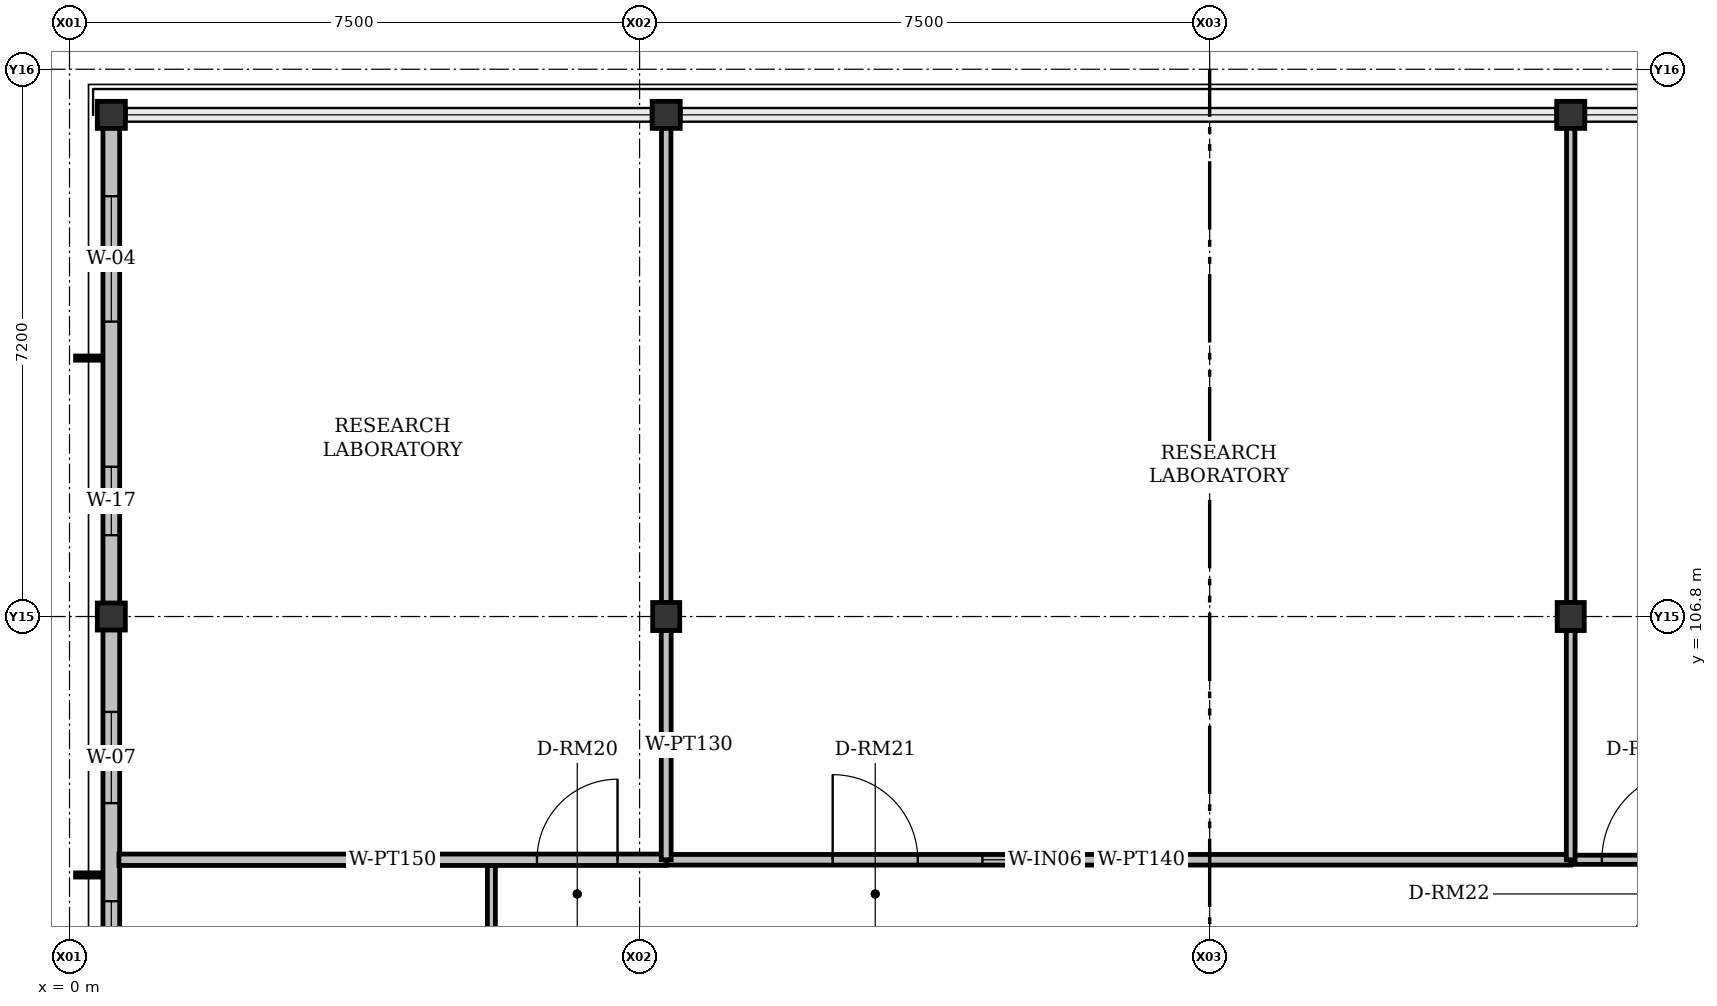
"""IFC4 building model, lengths in metres.
Left out: names, types, materials, properties, quantities, classifications, styles, units other than length and angle.
Written with IfcOpenShell. Run it as: python <this file> out.ifc"""

import sys

from ifc_helpers import new_model, si_unit, direction, frame, frame_2d, origin, origin_2d, place, context, subcontext, project, spatial, rectangle, i_section, extrude, element, fill, save


model = new_model("IFC4")
c1 = context("Model", 3, precision=1e-05, world=origin(), true_north=direction((0.0, 1.0)))
c2 = subcontext(c1, "Body", "Model", "MODEL_VIEW")
j1 = project(units=[si_unit("LENGTHUNIT", "METRE"), si_unit("PLANEANGLEUNIT", "RADIAN")], contexts=[c1])
p1 = place(None, origin())
s1 = spatial("IfcSite", under=j1, at=p1, CompositionType="ELEMENT")
p2 = place(p1, origin())
s2 = spatial("IfcBuilding", under=s1, at=p2, CompositionType="ELEMENT")
p3 = place(p2, frame((0.0, 0.0, 47.7)))
s3 = spatial("IfcBuildingStorey", under=s2, at=p3, CompositionType="ELEMENT", Elevation=47.7)
for number, where, z_axis, x_axis in (
    (1, (0.55, 106.8, 0.0), (0.0, 0.0, 1.0), (1.0, 0.0, 0.0)),
    (2, (7.85, 106.8, 0.0), (0.0, 0.0, 1.0), (0.0, 1.0, 0.0)),
    (3, (19.75, 106.8, 0.0), (0.0, 0.0, 1.0), (0.0, 1.0, 0.0)),
    (4, (0.55, 113.4, 0.0), (0.0, 0.0, 1.0), (1.0, 0.0, 0.0)),
    (5, (7.85, 113.4, 0.0), (0.0, 0.0, 1.0), (1.0, 0.0, 0.0)),
    (6, (19.75, 113.4, 0.0), (0.0, 0.0, 1.0), (1.0, 0.0, 0.0)),
):
    element("IfcColumn", number, at=place(p3, frame(where, z_axis=z_axis, x_axis=x_axis)), inside=s3, PredefinedType="COLUMN", context=c2, shape_type="SweptSolid", body=[
        extrude(i_section(OverallWidth=0.369, OverallDepth=0.356, WebThickness=0.011, FlangeThickness=0.018, FilletRadius=0.015, at=origin_2d()), origin(), (0.0, 0.0, 1.0), 4.2),
    ])
p4 = place(p3, frame((0.55, 99.6, 0.0), z_axis=(0.0, 0.0, 1.0), x_axis=(0.0, 1.0, 0.0)))
e7 = element("IfcWall", 7, at=p4, inside=s3, PredefinedType="SOLIDWALL", context=c2, shape_type="SweptSolid", body=[
    extrude(rectangle(XDim=7.2, YDim=0.22, at=frame_2d((3.6, 0.0))), origin(), (0.0, 0.0, 1.0), 3.577),
])
p5 = place(p4, frame((1.055, 0.0, 0.92)))
e8 = element("IfcOpeningElement", 8, at=p5, cuts=e7, PredefinedType="OPENING", context=c2, shape_type="SweptSolid", body=[
    extrude(rectangle(XDim=2.4, YDim=1.7, at=frame_2d((1.2, 0.85))), frame((0.0, 0.11, 0.0), z_axis=(0.0, -1.0, 0.0), x_axis=(1.0, 0.0, 0.0)), (0.0, 0.0, 1.0), 0.22),
])
p6 = place(p4, frame((4.745, 0.0, 0.92)))
e9 = element("IfcOpeningElement", 9, at=p6, cuts=e7, PredefinedType="OPENING", context=c2, shape_type="SweptSolid", body=[
    extrude(rectangle(XDim=1.2, YDim=1.55, at=frame_2d((0.6, 0.775))), frame((0.0, 0.11, 0.0), z_axis=(0.0, -1.0, 0.0), x_axis=(1.0, 0.0, 0.0)), (0.0, 0.0, 1.0), 0.22),
])
p7 = place(p3, frame((0.55, 106.8, 0.0), z_axis=(0.0, 0.0, 1.0), x_axis=(0.0, 1.0, 0.0)))
e10 = element("IfcWall", 10, at=p7, inside=s3, PredefinedType="SOLIDWALL", context=c2, shape_type="SweptSolid", body=[
    extrude(rectangle(XDim=6.6, YDim=0.22, at=frame_2d((3.3, 0.0))), origin(), (0.0, 0.0, 1.0), 3.577),
])
p8 = place(p7, frame((1.07, 0.0, 0.92)))
e11 = element("IfcOpeningElement", 11, at=p8, cuts=e10, PredefinedType="OPENING", context=c2, shape_type="SweptSolid", body=[
    extrude(rectangle(XDim=0.9, YDim=1.3, at=frame_2d((0.45, 0.65))), frame((0.0, 0.11, 0.0), z_axis=(0.0, -1.0, 0.0), x_axis=(1.0, 0.0, 0.0)), (0.0, 0.0, 1.0), 0.22),
])
p9 = place(p7, frame((3.88, 0.0, 0.92)))
e12 = element("IfcOpeningElement", 12, at=p9, cuts=e10, PredefinedType="OPENING", context=c2, shape_type="SweptSolid", body=[
    extrude(rectangle(XDim=1.65, YDim=1.4, at=frame_2d((0.825, 0.7))), frame((0.0, 0.11, 0.0), z_axis=(0.0, -1.0, 0.0), x_axis=(1.0, 0.0, 0.0)), (0.0, 0.0, 1.0), 0.22),
])
p10 = place(p3, frame((5.55, 85.2, 0.0), z_axis=(0.0, 0.0, 1.0), x_axis=(0.0, 1.0, 0.0)))
e13 = element("IfcWall", 13, at=p10, inside=s3, PredefinedType="PARTITIONING", context=c2, shape_type="SweptSolid", body=[
    extrude(rectangle(XDim=18.4, YDim=0.105, at=frame_2d((9.2, 0.0))), origin(), (0.0, 0.0, 1.0), 3.451),
])
p11 = place(p10, frame((8.7, 0.0, 0.0)))
e14 = element("IfcOpeningElement", 14, at=p11, cuts=e13, PredefinedType="OPENING", context=c2, shape_type="SweptSolid", body=[
    extrude(rectangle(XDim=1.0, YDim=2.25, at=frame_2d((0.5, 1.125))), frame((0.0, 0.052, 0.0), z_axis=(0.0, -1.0, 0.0), x_axis=(1.0, 0.0, 0.0)), (0.0, 0.0, 1.0), 0.105),
])
p12 = place(p10, frame((10.55, 0.0, 0.92)))
e15 = element("IfcOpeningElement", 15, at=p12, cuts=e13, PredefinedType="OPENING", context=c2, shape_type="SweptSolid", body=[
    extrude(rectangle(XDim=0.9, YDim=1.2, at=frame_2d((0.45, 0.6))), frame((0.0, 0.052, 0.0), z_axis=(0.0, -1.0, 0.0), x_axis=(1.0, 0.0, 0.0)), (0.0, 0.0, 1.0), 0.105),
])
p13 = place(p3, frame((0.65, 103.6, 0.0), z_axis=(0.0, 0.0, 1.0), x_axis=(1.0, 0.0, 0.0)))
e16 = element("IfcWall", 16, at=p13, inside=s3, PredefinedType="PARTITIONING", context=c2, shape_type="SweptSolid", body=[
    extrude(rectangle(XDim=7.2, YDim=0.15, at=frame_2d((3.6, 0.0))), origin(), (0.0, 0.0, 1.0), 3.527),
])
p14 = place(p13, frame((5.5, 0.0, 0.0)))
e17 = element("IfcOpeningElement", 17, at=p14, cuts=e16, PredefinedType="OPENING", context=c2, shape_type="SweptSolid", body=[
    extrude(rectangle(XDim=1.06, YDim=2.25, at=frame_2d((0.53, 1.125))), frame((0.0, 0.075, 0.0), z_axis=(0.0, -1.0, 0.0), x_axis=(1.0, 0.0, 0.0)), (0.0, 0.0, 1.0), 0.15),
])
p15 = place(p3, frame((7.85, 103.6, 0.0), z_axis=(0.0, 0.0, 1.0), x_axis=(1.0, 0.0, 0.0)))
e18 = element("IfcWall", 18, at=p15, inside=s3, PredefinedType="PARTITIONING", context=c2, shape_type="SweptSolid", body=[
    extrude(rectangle(XDim=11.9, YDim=0.14, at=frame_2d((5.95, 0.0))), origin(), (0.0, 0.0, 1.0), 3.527),
])
p16 = place(p15, frame((2.19, 0.0, 0.0)))
e19 = element("IfcOpeningElement", 19, at=p16, cuts=e18, PredefinedType="OPENING", context=c2, shape_type="SweptSolid", body=[
    extrude(rectangle(XDim=1.12, YDim=2.25, at=frame_2d((0.56, 1.125))), frame((0.0, 0.07, 0.0), z_axis=(0.0, -1.0, 0.0), x_axis=(1.0, 0.0, 0.0)), (0.0, 0.0, 1.0), 0.14),
])
p17 = place(p15, frame((4.16, 0.0, 0.92)))
e20 = element("IfcOpeningElement", 20, at=p17, cuts=e18, PredefinedType="OPENING", context=c2, shape_type="SweptSolid", body=[
    extrude(rectangle(XDim=1.05, YDim=1.2, at=frame_2d((0.525, 0.6))), frame((0.0, 0.07, 0.0), z_axis=(0.0, -1.0, 0.0), x_axis=(1.0, 0.0, 0.0)), (0.0, 0.0, 1.0), 0.14),
])
p18 = place(p3, frame((7.85, 106.621, 0.0), z_axis=(0.0, 0.0, 1.0), x_axis=(0.0, -1.0, 0.0)))
e21 = element("IfcWall", 21, at=p18, inside=s3, PredefinedType="PARTITIONING", context=c2, shape_type="SweptSolid", body=[
    extrude(rectangle(XDim=3.021, YDim=0.13, at=frame_2d((1.51, 0.0))), origin(), (0.0, 0.0, 1.0), 3.527),
])
p19 = place(p3, frame((7.85, 113.35, 0.0), z_axis=(0.0, 0.0, 1.0), x_axis=(0.0, -1.0, 0.0)))
e22 = element("IfcWall", 22, at=p19, inside=s3, PredefinedType="PARTITIONING", context=c2, shape_type="SweptSolid", body=[
    extrude(rectangle(XDim=6.371, YDim=0.125, at=frame_2d((3.185, 0.0))), origin(), (0.0, 0.0, 1.0), 3.527),
])
p20 = place(p3, frame((19.75, 103.6, 0.0), z_axis=(0.0, 0.0, 1.0), x_axis=(1.0, 0.0, 0.0)))
e23 = element("IfcWall", 23, at=p20, inside=s3, PredefinedType="PARTITIONING", context=c2, shape_type="SweptSolid", body=[
    extrude(rectangle(XDim=5.04, YDim=0.12, at=frame_2d((2.52, 0.0))), origin(), (0.0, 0.0, 1.0), 3.527),
])
p21 = place(p20, frame((0.41, 0.0, 0.0)))
e24 = element("IfcOpeningElement", 24, at=p21, cuts=e23, PredefinedType="OPENING", context=c2, shape_type="SweptSolid", body=[
    extrude(rectangle(XDim=1.18, YDim=2.25, at=frame_2d((0.59, 1.125))), frame((0.0, 0.06, 0.0), z_axis=(0.0, -1.0, 0.0), x_axis=(1.0, 0.0, 0.0)), (0.0, 0.0, 1.0), 0.12),
])
p22 = place(p3, frame((19.75, 106.621, 0.0), z_axis=(0.0, 0.0, 1.0), x_axis=(0.0, -1.0, 0.0)))
e25 = element("IfcWall", 25, at=p22, inside=s3, PredefinedType="PARTITIONING", context=c2, shape_type="SweptSolid", body=[
    extrude(rectangle(XDim=3.021, YDim=0.115, at=frame_2d((1.51, 0.0))), origin(), (0.0, 0.0, 1.0), 3.527),
])
p23 = place(p3, frame((19.75, 113.35, 0.0), z_axis=(0.0, 0.0, 1.0), x_axis=(0.0, -1.0, 0.0)))
e26 = element("IfcWall", 26, at=p23, inside=s3, PredefinedType="PARTITIONING", context=c2, shape_type="SweptSolid", body=[
    extrude(rectangle(XDim=6.371, YDim=0.11, at=frame_2d((3.185, 0.0))), origin(), (0.0, 0.0, 1.0), 3.527),
])
p24 = place(p5, origin())
e27 = element("IfcWindow", 27, at=p24, inside=s3, PartitioningType="DOUBLE_PANEL_VERTICAL", PredefinedType="WINDOW", context=c2, shape_type="SweptSolid", body=[
    extrude(rectangle(XDim=2.4, YDim=1.7, at=frame_2d((1.2, 0.85))), frame((0.0, 0.03, 0.0), z_axis=(0.0, -1.0, 0.0), x_axis=(1.0, 0.0, 0.0)), (0.0, 0.0, 1.0), 0.06),
])
fill(e8, e27)
p25 = place(p6, origin())
e28 = element("IfcWindow", 28, at=p25, inside=s3, PartitioningType="SINGLE_PANEL", PredefinedType="WINDOW", context=c2, shape_type="SweptSolid", body=[
    extrude(rectangle(XDim=1.2, YDim=1.55, at=frame_2d((0.6, 0.775))), frame((0.0, 0.03, 0.0), z_axis=(0.0, -1.0, 0.0), x_axis=(1.0, 0.0, 0.0)), (0.0, 0.0, 1.0), 0.06),
])
fill(e9, e28)
p26 = place(p8, origin())
e29 = element("IfcWindow", 29, at=p26, inside=s3, PartitioningType="SINGLE_PANEL", PredefinedType="WINDOW", context=c2, shape_type="SweptSolid", body=[
    extrude(rectangle(XDim=0.9, YDim=1.3, at=frame_2d((0.45, 0.65))), frame((0.0, 0.03, 0.0), z_axis=(0.0, -1.0, 0.0), x_axis=(1.0, 0.0, 0.0)), (0.0, 0.0, 1.0), 0.06),
])
fill(e11, e29)
p27 = place(p9, origin())
e30 = element("IfcWindow", 30, at=p27, inside=s3, PartitioningType="DOUBLE_PANEL_VERTICAL", PredefinedType="WINDOW", context=c2, shape_type="SweptSolid", body=[
    extrude(rectangle(XDim=1.65, YDim=1.4, at=frame_2d((0.825, 0.7))), frame((0.0, 0.03, 0.0), z_axis=(0.0, -1.0, 0.0), x_axis=(1.0, 0.0, 0.0)), (0.0, 0.0, 1.0), 0.06),
])
fill(e12, e30)
p28 = place(p14, origin())
e31 = element("IfcDoor", 31, at=p28, inside=s3, OperationType="SINGLE_SWING_RIGHT", PredefinedType="DOOR", context=c2, shape_type="SweptSolid", body=[
    extrude(rectangle(XDim=1.06, YDim=2.25, at=frame_2d((0.53, 1.125))), frame((0.0, 0.025, 0.0), z_axis=(0.0, -1.0, 0.0), x_axis=(1.0, 0.0, 0.0)), (0.0, 0.0, 1.0), 0.05),
])
fill(e17, e31)
p29 = place(p16, origin())
e32 = element("IfcDoor", 32, at=p29, inside=s3, OperationType="SINGLE_SWING_LEFT", PredefinedType="DOOR", context=c2, shape_type="SweptSolid", body=[
    extrude(rectangle(XDim=1.12, YDim=2.25, at=frame_2d((0.56, 1.125))), frame((0.0, 0.025, 0.0), z_axis=(0.0, -1.0, 0.0), x_axis=(1.0, 0.0, 0.0)), (0.0, 0.0, 1.0), 0.05),
])
fill(e19, e32)
p30 = place(p17, origin())
e33 = element("IfcWindow", 33, at=p30, inside=s3, PartitioningType="SINGLE_PANEL", PredefinedType="WINDOW", context=c2, shape_type="SweptSolid", body=[
    extrude(rectangle(XDim=1.05, YDim=1.2, at=frame_2d((0.525, 0.6))), frame((0.0, 0.03, 0.0), z_axis=(0.0, -1.0, 0.0), x_axis=(1.0, 0.0, 0.0)), (0.0, 0.0, 1.0), 0.06),
])
fill(e20, e33)
p31 = place(p21, origin())
e34 = element("IfcDoor", 34, at=p31, inside=s3, OperationType="SINGLE_SWING_RIGHT", PredefinedType="DOOR", context=c2, shape_type="SweptSolid", body=[
    extrude(rectangle(XDim=1.18, YDim=2.25, at=frame_2d((0.59, 1.125))), frame((0.0, 0.025, 0.0), z_axis=(0.0, -1.0, 0.0), x_axis=(1.0, 0.0, 0.0)), (0.0, 0.0, 1.0), 0.05),
])
fill(e24, e34)
save(model, sys.argv[1])
